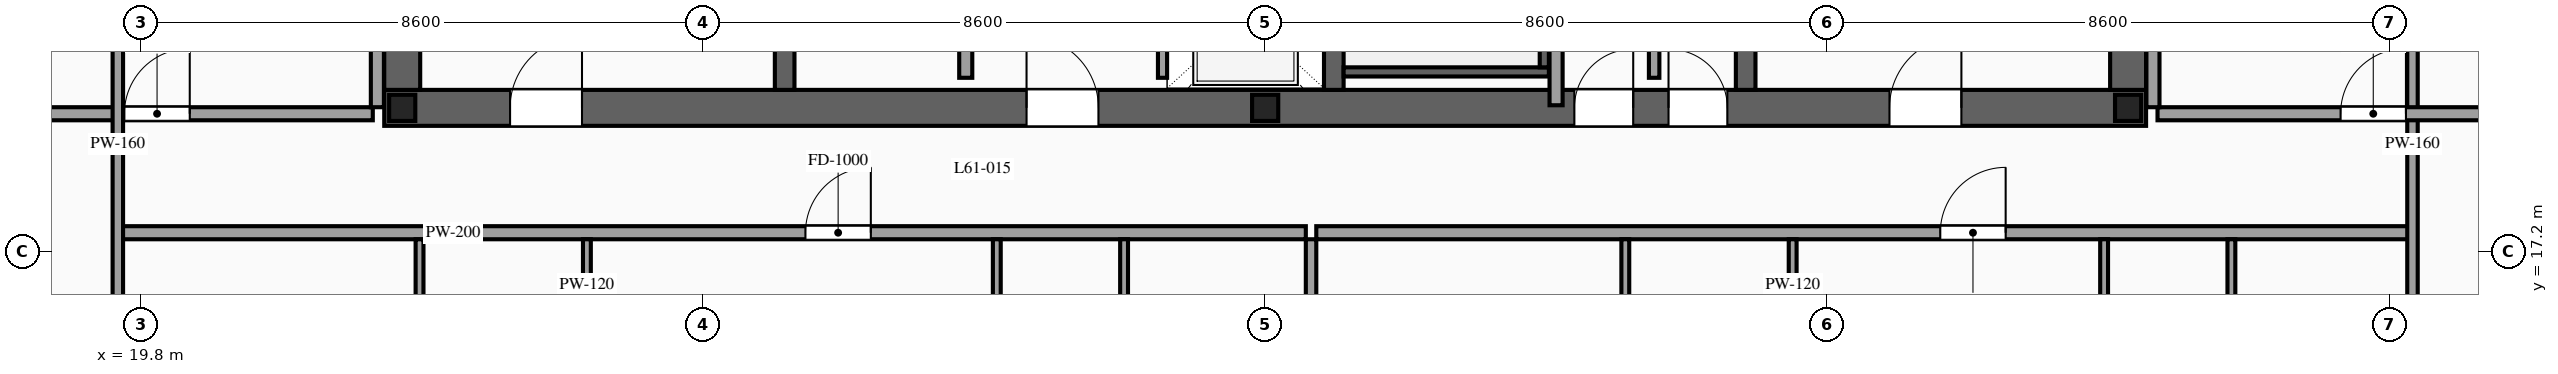
"""IFC4 building model, lengths in metres.
Left out: names, types, materials, properties, quantities, classifications, styles, units other than length and angle.
Written with IfcOpenShell. Run it as: python <this file> out.ifc"""

import sys

from ifc_helpers import new_model, si_unit, direction, frame, frame_2d, origin, origin_2d, place, context, subcontext, project, spatial, rectangle, i_section, extrude, source, transform, mapped, element, fill, save


model = new_model("IFC4")
c1 = context("Model", 3, precision=1e-05, world=origin(), true_north=direction((0.0, 1.0)))
c2 = subcontext(c1, "Body", "Model", "MODEL_VIEW")
j1 = project(units=[si_unit("LENGTHUNIT", "METRE"), si_unit("PLANEANGLEUNIT", "RADIAN")], contexts=[c1])
p1 = place(None, origin())
s1 = spatial("IfcSite", under=j1, at=p1, CompositionType="ELEMENT")
p2 = place(p1, origin())
s2 = spatial("IfcBuilding", under=s1, at=p2, CompositionType="ELEMENT")
p3 = place(p2, frame((0.0, 0.0, 231.1)))
s3 = spatial("IfcBuildingStorey", under=s2, at=p3, CompositionType="ELEMENT", Elevation=231.1)
p4 = place(p3, frame((23.525, 19.4, 0.0), z_axis=(0.0, 0.0, 1.0), x_axis=(1.0, 0.0, 0.0)))
e1 = element("IfcWall", 1, at=p4, inside=s3, PredefinedType="SHEAR", context=c2, shape_type="SweptSolid", body=[
    extrude(rectangle(XDim=26.95, YDim=0.55, at=frame_2d((13.475, 0.0))), origin(), (0.0, 0.0, 1.0), 3.5),
])
p5 = place(p4, frame((1.925, 0.0, 0.0)))
e2 = element("IfcOpeningElement", 2, at=p5, cuts=e1, PredefinedType="OPENING", context=c2, shape_type="SweptSolid", body=[
    extrude(rectangle(XDim=1.1, YDim=2.2, at=frame_2d((0.55, 1.1))), frame((0.0, 0.29, 0.0), z_axis=(0.0, -1.0, 0.0), x_axis=(1.0, 0.0, 0.0)), (0.0, 0.0, 1.0), 0.58),
])
p6 = place(p4, frame((9.825, 0.0, 0.0)))
e3 = element("IfcOpeningElement", 3, at=p6, cuts=e1, PredefinedType="OPENING", context=c2, shape_type="SweptSolid", body=[
    extrude(rectangle(XDim=1.1, YDim=2.2, at=frame_2d((0.55, 1.1))), frame((0.0, 0.29, 0.0), z_axis=(0.0, -1.0, 0.0), x_axis=(1.0, 0.0, 0.0)), (0.0, 0.0, 1.0), 0.58),
])
p7 = place(p4, frame((23.025, 0.0, 0.0)))
e4 = element("IfcOpeningElement", 4, at=p7, cuts=e1, PredefinedType="OPENING", context=c2, shape_type="SweptSolid", body=[
    extrude(rectangle(XDim=1.1, YDim=2.2, at=frame_2d((0.55, 1.1))), frame((0.0, 0.29, 0.0), z_axis=(0.0, -1.0, 0.0), x_axis=(1.0, 0.0, 0.0)), (0.0, 0.0, 1.0), 0.58),
])
p8 = place(p4, frame((19.645, 0.0, 0.0)))
e5 = element("IfcOpeningElement", 5, at=p8, cuts=e1, PredefinedType="OPENING", context=c2, shape_type="SweptSolid", body=[
    extrude(rectangle(XDim=0.9, YDim=2.15, at=frame_2d((0.45, 1.075))), frame((0.0, 0.29, 0.0), z_axis=(0.0, -1.0, 0.0), x_axis=(1.0, 0.0, 0.0)), (0.0, 0.0, 1.0), 0.58),
])
p9 = place(p4, frame((18.205, 0.0, 0.0)))
e6 = element("IfcOpeningElement", 6, at=p9, cuts=e1, PredefinedType="OPENING", context=c2, shape_type="SweptSolid", body=[
    extrude(rectangle(XDim=0.9, YDim=2.15, at=frame_2d((0.45, 1.075))), frame((0.0, 0.29, 0.0), z_axis=(0.0, -1.0, 0.0), x_axis=(1.0, 0.0, 0.0)), (0.0, 0.0, 1.0), 0.58),
])
m1 = source(origin(), c2, "Body", "SweptSolid", [
    extrude(rectangle(XDim=12.25, YDim=0.55, at=frame_2d((6.125, 0.0))), origin(), (0.0, 0.0, 1.0), 3.5),
])
for number, where, z_axis, x_axis in (
    (7, (23.8, 19.675, 0.0), (0.0, 0.0, 1.0), (0.0, 1.0, 0.0)),
    (8, (50.2, 19.675, 0.0), (0.0, 0.0, 1.0), (0.0, 1.0, 0.0)),
):
    element("IfcWall", number, at=place(p3, frame(where, z_axis=z_axis, x_axis=x_axis)), inside=s3, PredefinedType="SHEAR", context=c2, shape_type="MappedRepresentation", body=[
        mapped(m1, transform((0.0, 0.0, 0.0), scale=1.0)),
    ])
m2 = source(origin(), c2, "Body", "SweptSolid", [
    extrude(rectangle(XDim=12.25, YDim=0.3, at=frame_2d((6.125, 0.0))), origin(), (0.0, 0.0, 1.0), 3.5),
])
for number, where, z_axis, x_axis in (
    (9, (29.65, 19.675, 0.0), (0.0, 0.0, 1.0), (0.0, 1.0, 0.0)),
    (10, (38.05, 19.675, 0.0), (0.0, 0.0, 1.0), (0.0, 1.0, 0.0)),
    (11, (44.35, 19.675, 0.0), (0.0, 0.0, 1.0), (0.0, 1.0, 0.0)),
):
    element("IfcWall", number, at=place(p3, frame(where, z_axis=z_axis, x_axis=x_axis)), inside=s3, PredefinedType="SOLIDWALL", context=c2, shape_type="MappedRepresentation", body=[
        mapped(m2, transform((0.0, 0.0, 0.0), scale=1.0)),
    ])
m3 = source(origin(), c2, "Body", "SweptSolid", [
    extrude(i_section(OverallWidth=0.4, OverallDepth=0.4, WebThickness=0.013, FlangeThickness=0.021, at=origin_2d()), origin(), (0.0, 0.0, 1.0), 3.5),
])
for number, where, z_axis, x_axis in (
    (12, (23.8, 19.4, 0.0), (0.0, 0.0, 1.0), (1.0, 0.0, 0.0)),
    (13, (37.0, 19.4, 0.0), (0.0, 0.0, 1.0), (1.0, 0.0, 0.0)),
    (14, (50.2, 19.4, 0.0), (0.0, 0.0, 1.0), (1.0, 0.0, 0.0)),
):
    element("IfcColumn", number, at=place(p3, frame(where, z_axis=z_axis, x_axis=x_axis)), inside=s3, PredefinedType="COLUMN", context=c2, shape_type="MappedRepresentation", body=[
        mapped(m3, transform((0.0, 0.0, 0.0), scale=1.0)),
    ])
p10 = place(p3, frame((35.43, 19.86, 0.0), z_axis=(0.0, 0.0, 1.0), x_axis=(0.0, 1.0, 0.0)))
e15 = element("IfcWall", 15, at=p10, inside=s3, PredefinedType="SOLIDWALL", context=c2, shape_type="SweptSolid", body=[
    extrude(rectangle(XDim=2.04, YDim=0.14, at=frame_2d((1.02, 0.0))), origin(), (0.0, 0.0, 1.0), 3.28),
])
p11 = place(p10, frame((0.47, 0.0, 0.0)))
e16 = element("IfcOpeningElement", 16, at=p11, cuts=e15, PredefinedType="OPENING", context=c2, shape_type="SweptSolid", body=[
    extrude(rectangle(XDim=1.1, YDim=2.2, at=frame_2d((0.55, 1.1))), frame((0.0, 0.085, 0.0), z_axis=(0.0, -1.0, 0.0), x_axis=(1.0, 0.0, 0.0)), (0.0, 0.0, 1.0), 0.17),
])
m4 = source(origin(), c2, "Body", "SweptSolid", [
    extrude(rectangle(XDim=3.14, YDim=0.14, at=frame_2d((1.57, 0.0))), origin(), (0.0, 0.0, 1.0), 3.28),
])
p12 = place(p3, frame((38.2, 19.95, 0.0), z_axis=(0.0, 0.0, 1.0), x_axis=(1.0, 0.0, 0.0)))
e17 = element("IfcWall", 17, at=p12, inside=s3, PredefinedType="SOLIDWALL", context=c2, shape_type="MappedRepresentation", body=[
    mapped(m4, transform((0.0, 0.0, 0.0), scale=1.0)),
])
m5 = source(origin(), c2, "Body", "SweptSolid", [
    extrude(rectangle(XDim=8.94, YDim=0.14, at=frame_2d((4.47, 0.0))), origin(), (0.0, 0.0, 1.0), 3.28),
])
p13 = place(p3, frame((41.27, 20.02, 0.0), z_axis=(0.0, 0.0, 1.0), x_axis=(0.0, 1.0, 0.0)))
e18 = element("IfcWall", 18, at=p13, inside=s3, PredefinedType="SOLIDWALL", context=c2, shape_type="MappedRepresentation", body=[
    mapped(m5, transform((0.0, 0.0, 0.0), scale=1.0)),
])
p14 = place(p3, frame((32.42, 19.86, 0.0), z_axis=(0.0, 0.0, 1.0), x_axis=(0.0, 1.0, 0.0)))
e19 = element("IfcWall", 19, at=p14, inside=s3, PredefinedType="PARTITIONING", context=c2, shape_type="SweptSolid", body=[
    extrude(rectangle(XDim=5.84, YDim=0.2, at=frame_2d((2.92, 0.0))), origin(), (0.0, 0.0, 1.0), 3.28),
])
p15 = place(p14, frame((2.47, 0.0, 0.0)))
e20 = element("IfcOpeningElement", 20, at=p15, cuts=e19, PredefinedType="OPENING", context=c2, shape_type="SweptSolid", body=[
    extrude(rectangle(XDim=0.9, YDim=2.15, at=frame_2d((0.45, 1.075))), frame((0.0, 0.115, 0.0), z_axis=(0.0, -1.0, 0.0), x_axis=(1.0, 0.0, 0.0)), (0.0, 0.0, 1.0), 0.23),
])
m6 = source(origin(), c2, "Body", "SweptSolid", [
    extrude(rectangle(XDim=1.34, YDim=0.16, at=frame_2d((0.67, 0.0))), origin(), (0.0, 0.0, 1.0), 3.28),
])
p16 = place(p3, frame((42.95, 19.86, 0.0), z_axis=(0.0, 0.0, 1.0), x_axis=(0.0, 1.0, 0.0)))
e21 = element("IfcWall", 21, at=p16, inside=s3, PredefinedType="PARTITIONING", context=c2, shape_type="MappedRepresentation", body=[
    mapped(m6, transform((0.0, 0.0, 0.0), scale=1.0)),
])
m7 = source(origin(), c2, "Body", "SweptSolid", [
    extrude(rectangle(XDim=12.72, YDim=0.2, at=frame_2d((6.36, 0.0))), origin(), (0.0, 0.0, 1.0), 3.28),
])
p17 = place(p3, frame((41.45, 19.44, 0.0), z_axis=(0.0, 0.0, 1.0), x_axis=(0.0, 1.0, 0.0)))
e22 = element("IfcWall", 22, at=p17, inside=s3, PredefinedType="PARTITIONING", context=c2, shape_type="MappedRepresentation", body=[
    mapped(m7, transform((0.0, 0.0, 0.0), scale=1.0)),
])
p18 = place(p3, frame((19.44, 17.49, 0.0), z_axis=(0.0, 0.0, 1.0), x_axis=(1.0, 0.0, 0.0)))
e23 = element("IfcWall", 23, at=p18, inside=s3, PredefinedType="PARTITIONING", context=c2, shape_type="SweptSolid", body=[
    extrude(rectangle(XDim=18.182, YDim=0.2, at=frame_2d((9.091, 0.0))), origin(), (0.0, 0.0, 1.0), 3.28),
])
p19 = place(p18, frame((10.528, 0.0, 0.0)))
e24 = element("IfcOpeningElement", 24, at=p19, cuts=e23, PredefinedType="OPENING", context=c2, shape_type="SweptSolid", body=[
    extrude(rectangle(XDim=1.0, YDim=2.2, at=frame_2d((0.5, 1.1))), frame((0.0, 0.115, 0.0), z_axis=(0.0, -1.0, 0.0), x_axis=(1.0, 0.0, 0.0)), (0.0, 0.0, 1.0), 0.23),
])
m8 = source(origin(), c2, "Body", "SweptSolid", [
    extrude(rectangle(XDim=12.04, YDim=0.16, at=frame_2d((6.02, 0.0))), origin(), (0.0, 0.0, 1.0), 3.28),
])
p20 = place(p3, frame((37.702, 5.35, 0.0), z_axis=(0.0, 0.0, 1.0), x_axis=(0.0, 1.0, 0.0)))
e25 = element("IfcWall", 25, at=p20, inside=s3, PredefinedType="PARTITIONING", context=c2, shape_type="MappedRepresentation", body=[
    mapped(m8, transform((0.0, 0.0, 0.0), scale=1.0)),
])
m9 = source(origin(), c2, "Body", "SweptSolid", [
    extrude(rectangle(XDim=4.11, YDim=0.12, at=frame_2d((2.055, 0.0))), origin(), (0.0, 0.0, 1.0), 3.28),
])
p21 = place(p3, frame((24.065, 13.28, 0.0), z_axis=(0.0, 0.0, 1.0), x_axis=(0.0, 1.0, 0.0)))
e26 = element("IfcWall", 26, at=p21, inside=s3, PredefinedType="PARTITIONING", context=c2, shape_type="MappedRepresentation", body=[
    mapped(m9, transform((0.0, 0.0, 0.0), scale=1.0)),
])
p22 = place(p3, frame((26.625, 13.28, 0.0), z_axis=(0.0, 0.0, 1.0), x_axis=(0.0, 1.0, 0.0)))
e27 = element("IfcWall", 27, at=p22, inside=s3, PredefinedType="PARTITIONING", context=c2, shape_type="SweptSolid", body=[
    extrude(rectangle(XDim=4.11, YDim=0.12, at=frame_2d((2.055, 0.0))), origin(), (0.0, 0.0, 1.0), 3.28),
])
p23 = place(p22, frame((1.63, 0.0, 0.0)))
e28 = element("IfcOpeningElement", 28, at=p23, cuts=e27, PredefinedType="OPENING", context=c2, shape_type="SweptSolid", body=[
    extrude(rectangle(XDim=0.85, YDim=2.1, at=frame_2d((0.425, 1.05))), frame((0.0, 0.075, 0.0), z_axis=(0.0, -1.0, 0.0), x_axis=(1.0, 0.0, 0.0)), (0.0, 0.0, 1.0), 0.15),
])
for number, where, z_axis, x_axis in (
    (29, (34.842, 13.28, 0.0), (0.0, 0.0, 1.0), (0.0, 1.0, 0.0)),
    (30, (32.895, 13.28, 0.0), (0.0, 0.0, 1.0), (0.0, 1.0, 0.0)),
):
    element("IfcWall", number, at=place(p3, frame(where, z_axis=z_axis, x_axis=x_axis)), inside=s3, PredefinedType="PARTITIONING", context=c2, shape_type="MappedRepresentation", body=[
        mapped(m9, transform((0.0, 0.0, 0.0), scale=1.0)),
    ])
p24 = place(p3, frame((37.782, 17.49, 0.0), z_axis=(0.0, 0.0, 1.0), x_axis=(1.0, 0.0, 0.0)))
e31 = element("IfcWall", 31, at=p24, inside=s3, PredefinedType="PARTITIONING", context=c2, shape_type="SweptSolid", body=[
    extrude(rectangle(XDim=16.778, YDim=0.2, at=frame_2d((8.389, 0.0))), origin(), (0.0, 0.0, 1.0), 3.28),
])
p25 = place(p24, frame((9.545, 0.0, 0.0)))
e32 = element("IfcOpeningElement", 32, at=p25, cuts=e31, PredefinedType="OPENING", context=c2, shape_type="SweptSolid", body=[
    extrude(rectangle(XDim=1.0, YDim=2.2, at=frame_2d((0.5, 1.1))), frame((0.0, 0.115, 0.0), z_axis=(0.0, -1.0, 0.0), x_axis=(1.0, 0.0, 0.0)), (0.0, 0.0, 1.0), 0.23),
])
p26 = place(p3, frame((42.509, 13.28, 0.0), z_axis=(0.0, 0.0, 1.0), x_axis=(0.0, 1.0, 0.0)))
e33 = element("IfcWall", 33, at=p26, inside=s3, PredefinedType="PARTITIONING", context=c2, shape_type="MappedRepresentation", body=[
    mapped(m9, transform((0.0, 0.0, 0.0), scale=1.0)),
])
p27 = place(p3, frame((45.069, 13.28, 0.0), z_axis=(0.0, 0.0, 1.0), x_axis=(0.0, 1.0, 0.0)))
e34 = element("IfcWall", 34, at=p27, inside=s3, PredefinedType="PARTITIONING", context=c2, shape_type="SweptSolid", body=[
    extrude(rectangle(XDim=4.11, YDim=0.12, at=frame_2d((2.055, 0.0))), origin(), (0.0, 0.0, 1.0), 3.28),
])
p28 = place(p27, frame((1.63, 0.0, 0.0)))
e35 = element("IfcOpeningElement", 35, at=p28, cuts=e34, PredefinedType="OPENING", context=c2, shape_type="SweptSolid", body=[
    extrude(rectangle(XDim=0.85, YDim=2.1, at=frame_2d((0.425, 1.05))), frame((0.0, 0.075, 0.0), z_axis=(0.0, -1.0, 0.0), x_axis=(1.0, 0.0, 0.0)), (0.0, 0.0, 1.0), 0.15),
])
for number, where, z_axis, x_axis in (
    (36, (51.78, 13.28, 0.0), (0.0, 0.0, 1.0), (0.0, 1.0, 0.0)),
    (37, (49.833, 13.28, 0.0), (0.0, 0.0, 1.0), (0.0, 1.0, 0.0)),
):
    element("IfcWall", number, at=place(p3, frame(where, z_axis=z_axis, x_axis=x_axis)), inside=s3, PredefinedType="PARTITIONING", context=c2, shape_type="MappedRepresentation", body=[
        mapped(m9, transform((0.0, 0.0, 0.0), scale=1.0)),
    ])
p29 = place(p3, frame((16.55, 19.31, 0.0), z_axis=(0.0, 0.0, 1.0), x_axis=(1.0, 0.0, 0.0)))
e38 = element("IfcWall", 38, at=p29, inside=s3, PredefinedType="PARTITIONING", context=c2, shape_type="SweptSolid", body=[
    extrude(rectangle(XDim=6.8, YDim=0.2, at=frame_2d((3.4, 0.0))), origin(), (0.0, 0.0, 1.0), 2.825),
])
p30 = place(p29, frame((3.0, 0.0, 0.0)))
e39 = element("IfcOpeningElement", 39, at=p30, cuts=e38, PredefinedType="OPENING", context=c2, shape_type="SweptSolid", body=[
    extrude(rectangle(XDim=1.0, YDim=2.2, at=frame_2d((0.5, 1.1))), frame((0.0, 0.115, 0.0), z_axis=(0.0, -1.0, 0.0), x_axis=(1.0, 0.0, 0.0)), (0.0, 0.0, 1.0), 0.23),
])
m10 = source(origin(), c2, "Body", "SweptSolid", [
    extrude(rectangle(XDim=6.29, YDim=0.2, at=frame_2d((3.145, 0.0))), origin(), (0.0, 0.0, 1.0), 3.28),
])
p31 = place(p3, frame((23.42, 19.41, 0.0), z_axis=(0.0, 0.0, 1.0), x_axis=(0.0, 1.0, 0.0)))
e40 = element("IfcWall", 40, at=p31, inside=s3, PredefinedType="PARTITIONING", context=c2, shape_type="MappedRepresentation", body=[
    mapped(m10, transform((0.0, 0.0, 0.0), scale=1.0)),
])
m11 = source(origin(), c2, "Body", "SweptSolid", [
    extrude(rectangle(XDim=26.69, YDim=0.16, at=frame_2d((13.345, 0.0))), origin(), (0.0, 0.0, 1.0), 3.28),
])
for number, where, z_axis, x_axis in (
    (41, (19.45, 5.5, 0.0), (0.0, 0.0, 1.0), (0.0, 1.0, 0.0)),
    (42, (54.55, 5.5, 0.0), (0.0, 0.0, 1.0), (0.0, 1.0, 0.0)),
):
    element("IfcWall", number, at=place(p3, frame(where, z_axis=z_axis, x_axis=x_axis)), inside=s3, PredefinedType="PARTITIONING", context=c2, shape_type="MappedRepresentation", body=[
        mapped(m11, transform((0.0, 0.0, 0.0), scale=1.0)),
    ])
p32 = place(p3, frame((50.65, 19.31, 0.0), z_axis=(0.0, 0.0, 1.0), x_axis=(1.0, 0.0, 0.0)))
e43 = element("IfcWall", 43, at=p32, inside=s3, PredefinedType="PARTITIONING", context=c2, shape_type="SweptSolid", body=[
    extrude(rectangle(XDim=6.8, YDim=0.2, at=frame_2d((3.4, 0.0))), origin(), (0.0, 0.0, 1.0), 2.825),
])
p33 = place(p32, frame((2.8, 0.0, 0.0)))
e44 = element("IfcOpeningElement", 44, at=p33, cuts=e43, PredefinedType="OPENING", context=c2, shape_type="SweptSolid", body=[
    extrude(rectangle(XDim=1.0, YDim=2.2, at=frame_2d((0.5, 1.1))), frame((0.0, 0.115, 0.0), z_axis=(0.0, -1.0, 0.0), x_axis=(1.0, 0.0, 0.0)), (0.0, 0.0, 1.0), 0.23),
])
p34 = place(p3, frame((50.58, 19.41, 0.0), z_axis=(0.0, 0.0, 1.0), x_axis=(0.0, 1.0, 0.0)))
e45 = element("IfcWall", 45, at=p34, inside=s3, PredefinedType="PARTITIONING", context=c2, shape_type="MappedRepresentation", body=[
    mapped(m10, transform((0.0, 0.0, 0.0), scale=1.0)),
])
m12 = source(origin(), c2, "Body", "SweptSolid", [
    extrude(rectangle(XDim=1.1, YDim=2.2, at=frame_2d((0.55, 1.1))), frame((0.0, 0.025, 0.0), z_axis=(0.0, -1.0, 0.0), x_axis=(1.0, 0.0, 0.0)), (0.0, 0.0, 1.0), 0.05),
])
p35 = place(p5, origin())
e46 = element("IfcDoor", 46, at=p35, inside=s3, OperationType="SINGLE_SWING_RIGHT", PredefinedType="DOOR", context=c2, shape_type="MappedRepresentation", body=[
    mapped(m12, transform((0.0, 0.0, 0.0), scale=1.0)),
])
fill(e2, e46)
p36 = place(p6, origin())
e47 = element("IfcDoor", 47, at=p36, inside=s3, OperationType="SINGLE_SWING_LEFT", PredefinedType="DOOR", context=c2, shape_type="MappedRepresentation", body=[
    mapped(m12, transform((0.0, 0.0, 0.0), scale=1.0)),
])
fill(e3, e47)
p37 = place(p7, origin())
e48 = element("IfcDoor", 48, at=p37, inside=s3, OperationType="SINGLE_SWING_RIGHT", PredefinedType="DOOR", context=c2, shape_type="MappedRepresentation", body=[
    mapped(m12, transform((0.0, 0.0, 0.0), scale=1.0)),
])
fill(e4, e48)
m13 = source(origin(), c2, "Body", "SweptSolid", [
    extrude(rectangle(XDim=0.9, YDim=2.15, at=frame_2d((0.45, 1.075))), frame((0.0, 0.025, 0.0), z_axis=(0.0, -1.0, 0.0), x_axis=(1.0, 0.0, 0.0)), (0.0, 0.0, 1.0), 0.05),
])
p38 = place(p8, origin())
e49 = element("IfcDoor", 49, at=p38, inside=s3, OperationType="SINGLE_SWING_LEFT", PredefinedType="DOOR", context=c2, shape_type="MappedRepresentation", body=[
    mapped(m13, transform((0.0, 0.0, 0.0), scale=1.0)),
])
fill(e5, e49)
p39 = place(p9, origin())
e50 = element("IfcDoor", 50, at=p39, inside=s3, OperationType="SINGLE_SWING_RIGHT", PredefinedType="DOOR", context=c2, shape_type="MappedRepresentation", body=[
    mapped(m13, transform((0.0, 0.0, 0.0), scale=1.0)),
])
fill(e6, e50)
m14 = source(origin(), c2, "Body", "SweptSolid", [
    extrude(rectangle(XDim=1.0, YDim=2.2, at=frame_2d((0.5, 1.1))), frame((0.0, 0.025, 0.0), z_axis=(0.0, -1.0, 0.0), x_axis=(1.0, 0.0, 0.0)), (0.0, 0.0, 1.0), 0.05),
])
p40 = place(p19, origin())
e51 = element("IfcDoor", 51, at=p40, inside=s3, OperationType="SINGLE_SWING_RIGHT", PredefinedType="DOOR", context=c2, shape_type="MappedRepresentation", body=[
    mapped(m14, transform((0.0, 0.0, 0.0), scale=1.0)),
])
fill(e24, e51)
p41 = place(p25, origin())
e52 = element("IfcDoor", 52, at=p41, inside=s3, OperationType="SINGLE_SWING_RIGHT", PredefinedType="DOOR", context=c2, shape_type="MappedRepresentation", body=[
    mapped(m14, transform((0.0, 0.0, 0.0), scale=1.0)),
])
fill(e32, e52)
p42 = place(p30, origin())
e53 = element("IfcDoor", 53, at=p42, inside=s3, OperationType="SINGLE_SWING_RIGHT", PredefinedType="DOOR", context=c2, shape_type="MappedRepresentation", body=[
    mapped(m14, transform((0.0, 0.0, 0.0), scale=1.0)),
])
fill(e39, e53)
p43 = place(p33, origin())
e54 = element("IfcDoor", 54, at=p43, inside=s3, OperationType="SINGLE_SWING_RIGHT", PredefinedType="DOOR", context=c2, shape_type="MappedRepresentation", body=[
    mapped(m14, transform((0.0, 0.0, 0.0), scale=1.0)),
])
fill(e44, e54)
save(model, sys.argv[1])
